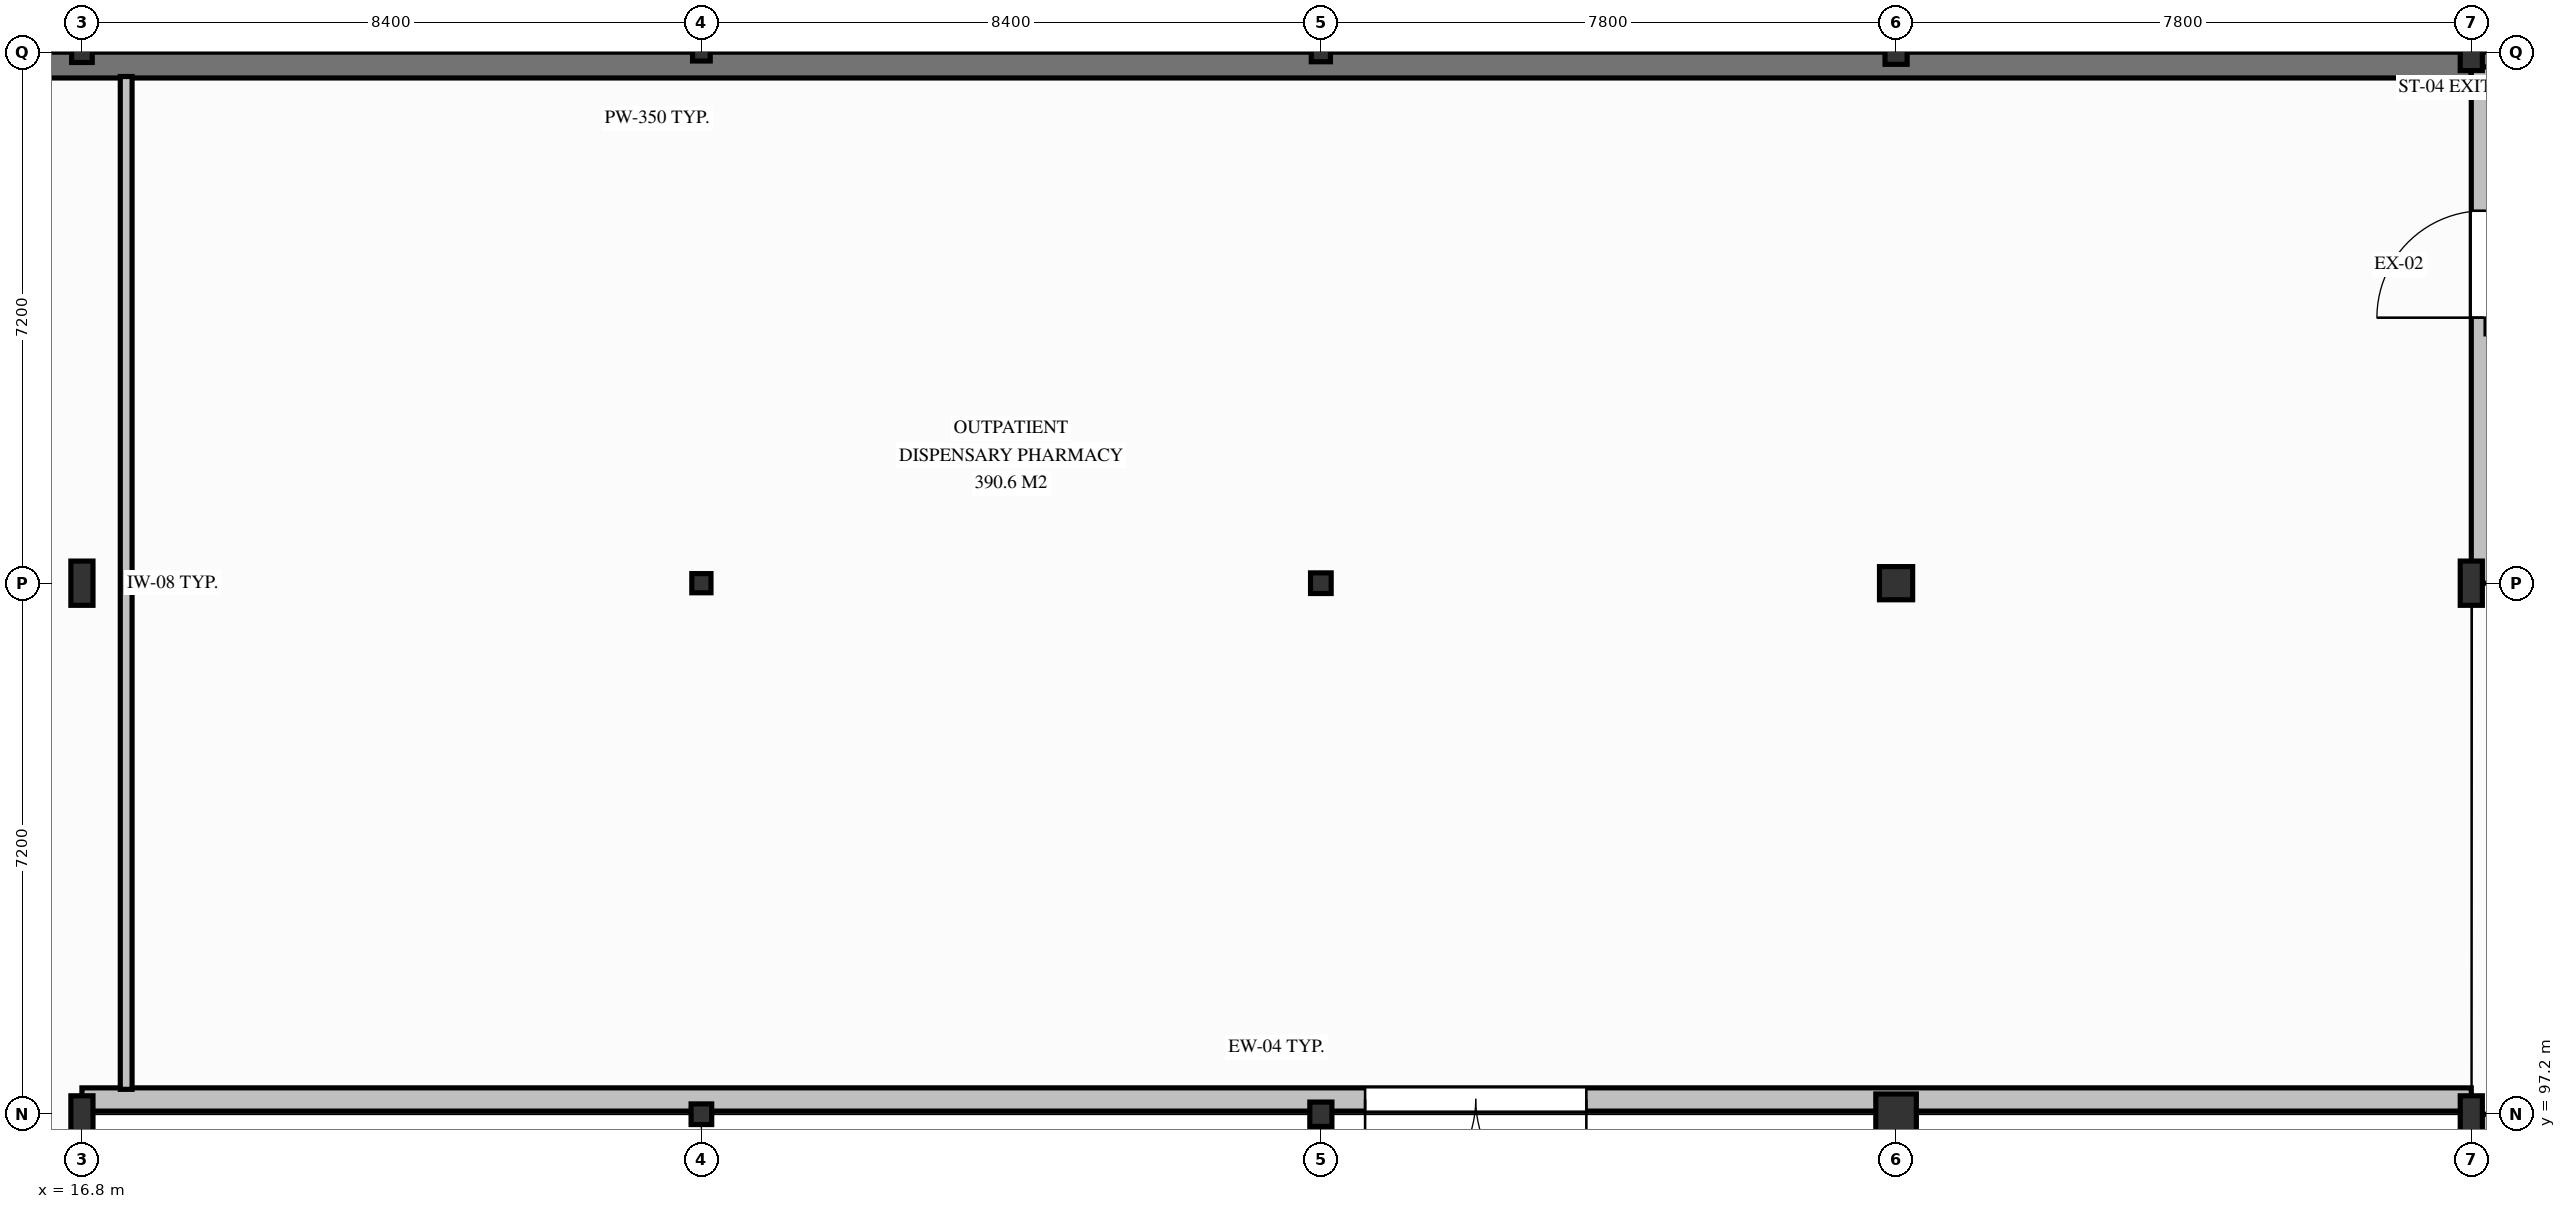
"""IFC4 building model, lengths in metres.
Left out: names, types, materials, properties, quantities, classifications, styles, units other than length and angle.
Written with IfcOpenShell. Run it as: python <this file> out.ifc"""

import sys

from ifc_helpers import new_model, si_unit, direction, frame, frame_2d, origin, origin_2d, place, context, subcontext, project, spatial, rectangle, i_section, extrude, element, fill, save


model = new_model("IFC4")
c1 = context("Model", 3, precision=1e-05, world=origin(), true_north=direction((0.0, 1.0)))
c2 = subcontext(c1, "Body", "Model", "MODEL_VIEW")
j1 = project(units=[si_unit("LENGTHUNIT", "METRE"), si_unit("PLANEANGLEUNIT", "RADIAN")], contexts=[c1])
p1 = place(None, origin())
s1 = spatial("IfcSite", under=j1, at=p1, CompositionType="ELEMENT")
p2 = place(p1, origin())
s2 = spatial("IfcBuilding", under=s1, at=p2, CompositionType="ELEMENT")
p3 = place(p2, origin())
s3 = spatial("IfcBuildingStorey", under=s2, at=p3, CompositionType="ELEMENT", Elevation=0.0)
p4 = place(p3, frame((0.0, 111.425, 0.0), z_axis=(0.0, 0.0, 1.0), x_axis=(1.0, 0.0, 0.0)))
e1 = element("IfcWall", 1, at=p4, inside=s3, PredefinedType="SHEAR", context=c2, shape_type="SweptSolid", body=[
    extrude(rectangle(XDim=49.2, YDim=0.35, at=frame_2d((24.6, 0.0))), origin(), (0.0, 0.0, 1.0), 4.5),
])
p5 = place(p3, frame((49.2, 111.425, 0.0), z_axis=(0.0, 0.0, 1.0), x_axis=(1.0, 0.0, 0.0)))
e2 = element("IfcWall", 2, at=p5, inside=s3, PredefinedType="SHEAR", context=c2, shape_type="SweptSolid", body=[
    extrude(rectangle(XDim=7.8, YDim=0.35, at=frame_2d((3.9, 0.0))), origin(), (0.0, 0.0, 1.0), 4.5),
])
p6 = place(p3, frame((16.8, 97.2, 0.0), z_axis=(0.0, 0.0, 1.0), x_axis=(1.0, 0.0, 0.0)))
e3 = element("IfcColumn", 3, at=p6, inside=s3, PredefinedType="COLUMN", context=c2, shape_type="SweptSolid", body=[
    extrude(i_section(OverallWidth=0.3, OverallDepth=0.5, WebThickness=0.014, FlangeThickness=0.028, FilletRadius=0.027, at=origin_2d()), origin(), (0.0, 0.0, 1.0), 4.5),
])
p7 = place(p3, frame((16.8, 104.4, 0.0), z_axis=(0.0, 0.0, 1.0), x_axis=(1.0, 0.0, 0.0)))
e4 = element("IfcColumn", 4, at=p7, inside=s3, PredefinedType="COLUMN", context=c2, shape_type="SweptSolid", body=[
    extrude(i_section(OverallWidth=0.3, OverallDepth=0.6, WebThickness=0.015, FlangeThickness=0.03, FilletRadius=0.027, at=origin_2d()), origin(), (0.0, 0.0, 1.0), 4.5),
])
for number, where, z_axis, x_axis in (
    (5, (16.8, 111.6, 0.0), (0.0, 0.0, 1.0), (1.0, 0.0, 0.0)),
    (6, (25.2, 97.2, 0.0), (0.0, 0.0, 1.0), (1.0, 0.0, 0.0)),
):
    element("IfcColumn", number, at=place(p3, frame(where, z_axis=z_axis, x_axis=x_axis)), inside=s3, PredefinedType="COLUMN", context=c2, shape_type="SweptSolid", body=[
        extrude(i_section(OverallWidth=0.28, OverallDepth=0.28, WebThickness=0.01, FlangeThickness=0.018, FilletRadius=0.024, at=origin_2d()), origin(), (0.0, 0.0, 1.0), 4.5),
    ])
p8 = place(p3, frame((25.2, 104.4, 0.0), z_axis=(0.0, 0.0, 1.0), x_axis=(1.0, 0.0, 0.0)))
e7 = element("IfcColumn", 7, at=p8, inside=s3, PredefinedType="COLUMN", context=c2, shape_type="SweptSolid", body=[
    extrude(i_section(OverallWidth=0.26, OverallDepth=0.26, WebThickness=0.01, FlangeThickness=0.018, FilletRadius=0.024, at=origin_2d()), origin(), (0.0, 0.0, 1.0), 4.5),
])
p9 = place(p3, frame((25.2, 111.6, 0.0), z_axis=(0.0, 0.0, 1.0), x_axis=(1.0, 0.0, 0.0)))
e8 = element("IfcColumn", 8, at=p9, inside=s3, PredefinedType="COLUMN", context=c2, shape_type="SweptSolid", body=[
    extrude(i_section(OverallWidth=0.24, OverallDepth=0.24, WebThickness=0.01, FlangeThickness=0.017, FilletRadius=0.021, at=origin_2d()), origin(), (0.0, 0.0, 1.0), 4.5),
])
p10 = place(p3, frame((33.6, 97.2, 0.0), z_axis=(0.0, 0.0, 1.0), x_axis=(1.0, 0.0, 0.0)))
e9 = element("IfcColumn", 9, at=p10, inside=s3, PredefinedType="COLUMN", context=c2, shape_type="SweptSolid", body=[
    extrude(i_section(OverallWidth=0.3, OverallDepth=0.33, WebThickness=0.01, FlangeThickness=0.017, FilletRadius=0.027, at=origin_2d()), origin(), (0.0, 0.0, 1.0), 4.5),
])
p11 = place(p3, frame((33.6, 104.4, 0.0), z_axis=(0.0, 0.0, 1.0), x_axis=(1.0, 0.0, 0.0)))
e10 = element("IfcColumn", 10, at=p11, inside=s3, PredefinedType="COLUMN", context=c2, shape_type="SweptSolid", body=[
    extrude(i_section(OverallWidth=0.28, OverallDepth=0.28, WebThickness=0.01, FlangeThickness=0.018, FilletRadius=0.024, at=origin_2d()), origin(), (0.0, 0.0, 1.0), 4.5),
])
p12 = place(p3, frame((33.6, 111.6, 0.0), z_axis=(0.0, 0.0, 1.0), x_axis=(1.0, 0.0, 0.0)))
e11 = element("IfcColumn", 11, at=p12, inside=s3, PredefinedType="COLUMN", context=c2, shape_type="SweptSolid", body=[
    extrude(i_section(OverallWidth=0.26, OverallDepth=0.26, WebThickness=0.01, FlangeThickness=0.018, FilletRadius=0.024, at=origin_2d()), origin(), (0.0, 0.0, 1.0), 4.5),
])
p13 = place(p3, frame((41.4, 97.2, 0.0), z_axis=(0.0, 0.0, 1.0), x_axis=(1.0, 0.0, 0.0)))
e12 = element("IfcColumn", 12, at=p13, inside=s3, PredefinedType="COLUMN", context=c2, shape_type="SweptSolid", body=[
    extrude(rectangle(XDim=0.55, YDim=0.55, at=origin_2d()), origin(), (0.0, 0.0, 1.0), 4.5),
])
p14 = place(p3, frame((41.4, 104.4, 0.0), z_axis=(0.0, 0.0, 1.0), x_axis=(1.0, 0.0, 0.0)))
e13 = element("IfcColumn", 13, at=p14, inside=s3, PredefinedType="COLUMN", context=c2, shape_type="SweptSolid", body=[
    extrude(rectangle(XDim=0.45, YDim=0.45, at=origin_2d()), origin(), (0.0, 0.0, 1.0), 4.5),
])
p15 = place(p3, frame((41.4, 111.6, 0.0), z_axis=(0.0, 0.0, 1.0), x_axis=(1.0, 0.0, 0.0)))
e14 = element("IfcColumn", 14, at=p15, inside=s3, PredefinedType="COLUMN", context=c2, shape_type="SweptSolid", body=[
    extrude(i_section(OverallWidth=0.3, OverallDepth=0.33, WebThickness=0.01, FlangeThickness=0.017, FilletRadius=0.027, at=origin_2d()), origin(), (0.0, 0.0, 1.0), 4.5),
])
p16 = place(p3, frame((49.2, 97.2, 0.0), z_axis=(0.0, 0.0, 1.0), x_axis=(1.0, 0.0, 0.0)))
e15 = element("IfcColumn", 15, at=p16, inside=s3, PredefinedType="COLUMN", context=c2, shape_type="SweptSolid", body=[
    extrude(i_section(OverallWidth=0.3, OverallDepth=0.5, WebThickness=0.014, FlangeThickness=0.028, FilletRadius=0.027, at=origin_2d()), origin(), (0.0, 0.0, 1.0), 4.5),
])
p17 = place(p3, frame((49.2, 104.4, 0.0), z_axis=(0.0, 0.0, 1.0), x_axis=(1.0, 0.0, 0.0)))
e16 = element("IfcColumn", 16, at=p17, inside=s3, PredefinedType="COLUMN", context=c2, shape_type="SweptSolid", body=[
    extrude(i_section(OverallWidth=0.3, OverallDepth=0.6, WebThickness=0.015, FlangeThickness=0.03, FilletRadius=0.027, at=origin_2d()), origin(), (0.0, 0.0, 1.0), 4.5),
])
p18 = place(p3, frame((49.2, 111.6, 0.0), z_axis=(0.0, 0.0, 1.0), x_axis=(1.0, 0.0, 0.0)))
e17 = element("IfcColumn", 17, at=p18, inside=s3, PredefinedType="COLUMN", context=c2, shape_type="SweptSolid", body=[
    extrude(i_section(OverallWidth=0.3, OverallDepth=0.5, WebThickness=0.014, FlangeThickness=0.028, FilletRadius=0.027, at=origin_2d()), origin(), (0.0, 0.0, 1.0), 4.5),
])
p19 = place(p3, frame((49.2, 97.4, 0.0), z_axis=(0.0, 0.0, 1.0), x_axis=(-1.0, 0.0, 0.0)))
e18 = element("IfcWall", 18, at=p19, inside=s3, PredefinedType="SOLIDWALL", context=c2, shape_type="SweptSolid", body=[
    extrude(rectangle(XDim=32.4, YDim=0.315, at=frame_2d((16.2, 0.0))), origin(), (0.0, 0.0, 1.0), 3.678),
])
p20 = place(p19, frame((12.0, 0.0, 0.0)))
e19 = element("IfcOpeningElement", 19, at=p20, cuts=e18, PredefinedType="OPENING", context=c2, shape_type="SweptSolid", body=[
    extrude(rectangle(XDim=3.0, YDim=2.55, at=frame_2d((1.5, 1.275))), frame((0.0, 0.167, 0.0), z_axis=(0.0, -1.0, 0.0), x_axis=(1.0, 0.0, 0.0)), (0.0, 0.0, 1.0), 0.335),
])
p21 = place(p3, frame((49.37, 82.8, 0.0), z_axis=(0.0, 0.0, 1.0), x_axis=(0.0, 1.0, 0.0)))
e20 = element("IfcWall", 20, at=p21, inside=s3, PredefinedType="SOLIDWALL", context=c2, shape_type="SweptSolid", body=[
    extrude(rectangle(XDim=14.4, YDim=0.34, at=frame_2d((7.2, 0.0))), origin(), (0.0, 0.0, 1.0), 3.828),
])
p22 = place(p21, frame((4.05, 0.0, 0.85)))
e21 = element("IfcOpeningElement", 21, at=p22, cuts=e20, PredefinedType="OPENING", context=c2, shape_type="SweptSolid", body=[
    extrude(rectangle(XDim=1.5, YDim=1.85, at=frame_2d((0.75, 0.925))), frame((0.0, 0.18, 0.0), z_axis=(0.0, -1.0, 0.0), x_axis=(1.0, 0.0, 0.0)), (0.0, 0.0, 1.0), 0.36),
])
p23 = place(p21, frame((8.8, 0.0, 0.85)))
e22 = element("IfcOpeningElement", 22, at=p23, cuts=e20, PredefinedType="OPENING", context=c2, shape_type="SweptSolid", body=[
    extrude(rectangle(XDim=1.6, YDim=1.9, at=frame_2d((0.8, 0.95))), frame((0.0, 0.18, 0.0), z_axis=(0.0, -1.0, 0.0), x_axis=(1.0, 0.0, 0.0)), (0.0, 0.0, 1.0), 0.36),
])
p24 = place(p3, frame((49.37, 104.4, 0.0), z_axis=(0.0, 0.0, 1.0), x_axis=(0.0, 1.0, 0.0)))
e23 = element("IfcWall", 23, at=p24, inside=s3, PredefinedType="SOLIDWALL", context=c2, shape_type="SweptSolid", body=[
    extrude(rectangle(XDim=7.0, YDim=0.34, at=frame_2d((3.5, 0.0))), origin(), (0.0, 0.0, 1.0), 3.928),
])
p25 = place(p24, frame((3.6, 0.0, 0.0)))
e24 = element("IfcOpeningElement", 24, at=p25, cuts=e23, PredefinedType="OPENING", context=c2, shape_type="SweptSolid", body=[
    extrude(rectangle(XDim=1.45, YDim=2.3, at=frame_2d((0.725, 1.15))), frame((0.0, 0.18, 0.0), z_axis=(0.0, -1.0, 0.0), x_axis=(1.0, 0.0, 0.0)), (0.0, 0.0, 1.0), 0.36),
])
p26 = place(p3, frame((17.4, 97.538, 0.0), z_axis=(0.0, 0.0, 1.0), x_axis=(0.0, 1.0, 0.0)))
e25 = element("IfcWall", 25, at=p26, inside=s3, PredefinedType="PARTITIONING", context=c2, shape_type="SweptSolid", body=[
    extrude(rectangle(XDim=13.732, YDim=0.16, at=frame_2d((6.866, 0.0))), origin(), (0.0, 0.0, 1.0), 3.788),
])
p27 = place(p20, origin())
e26 = element("IfcDoor", 26, at=p27, inside=s3, OperationType="DOUBLE_DOOR_SINGLE_SWING", PredefinedType="GATE", context=c2, shape_type="SweptSolid", body=[
    extrude(rectangle(XDim=3.0, YDim=2.55, at=frame_2d((1.5, 1.275))), frame((0.0, 0.025, 0.0), z_axis=(0.0, -1.0, 0.0), x_axis=(1.0, 0.0, 0.0)), (0.0, 0.0, 1.0), 0.05),
])
fill(e19, e26)
p28 = place(p25, origin())
e27 = element("IfcDoor", 27, at=p28, inside=s3, OperationType="SINGLE_SWING_LEFT", PredefinedType="DOOR", context=c2, shape_type="SweptSolid", body=[
    extrude(rectangle(XDim=1.45, YDim=2.3, at=frame_2d((0.725, 1.15))), frame((0.0, 0.025, 0.0), z_axis=(0.0, -1.0, 0.0), x_axis=(1.0, 0.0, 0.0)), (0.0, 0.0, 1.0), 0.05),
])
fill(e24, e27)
save(model, sys.argv[1])
